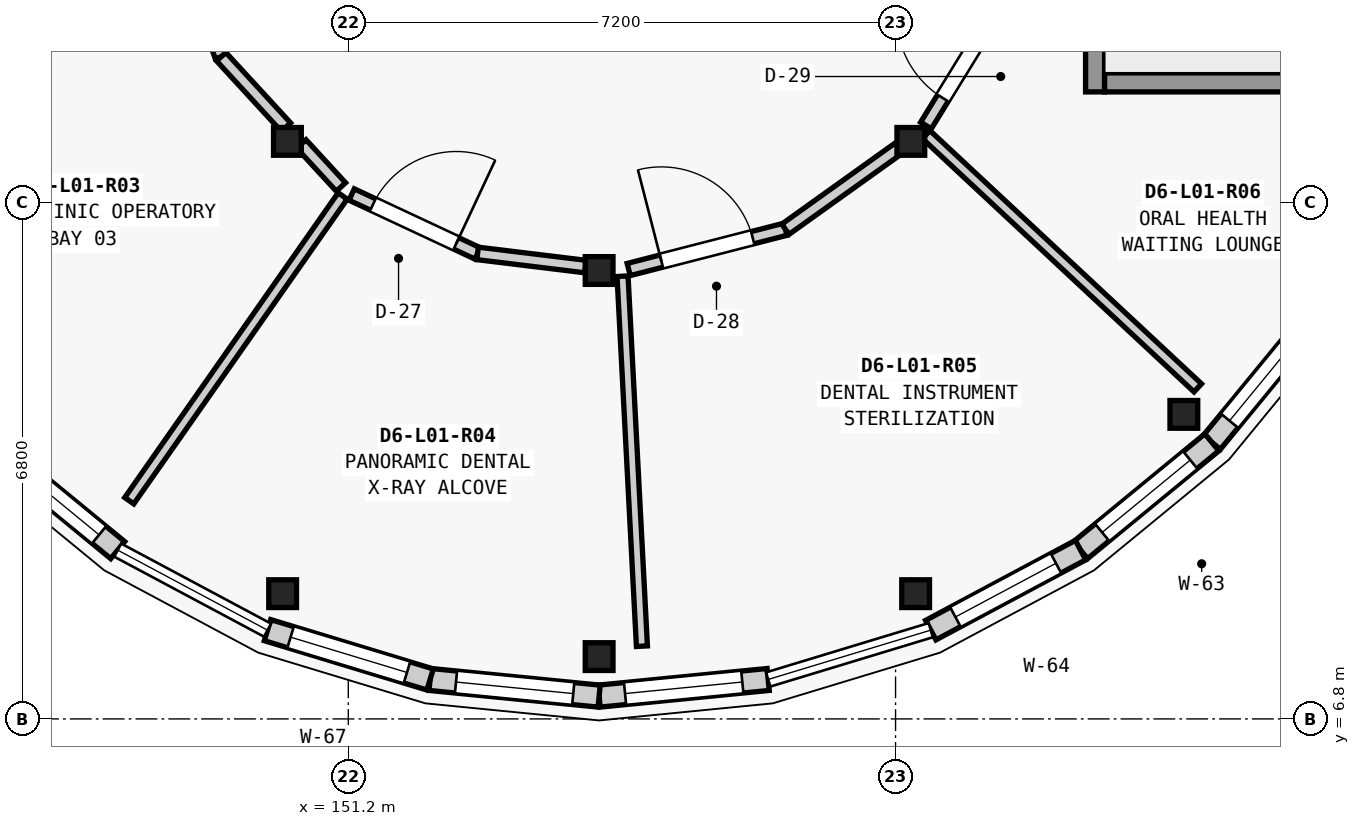
"""IFC4 building model, lengths in metres.
Left out: names, types, materials, properties, quantities, classifications, styles, units other than length and angle.
Written with IfcOpenShell. Run it as: python <this file> out.ifc"""

import sys

from ifc_helpers import new_model, si_unit, direction, frame, frame_2d, origin, origin_2d, place, context, subcontext, project, spatial, rectangle, extrude, element, fill, save


model = new_model("IFC4")
c1 = context("Model", 3, precision=1e-05, world=origin(), true_north=direction((0.0, 1.0)))
c2 = subcontext(c1, "Body", "Model", "MODEL_VIEW")
j1 = project(units=[si_unit("LENGTHUNIT", "METRE"), si_unit("PLANEANGLEUNIT", "RADIAN")], contexts=[c1])
p1 = place(None, origin())
s1 = spatial("IfcSite", under=j1, at=p1, CompositionType="ELEMENT")
p2 = place(p1, origin())
s2 = spatial("IfcBuilding", under=s1, at=p2, CompositionType="ELEMENT")
p3 = place(p2, frame((0.0, 0.0, 4.55)))
s3 = spatial("IfcBuildingStorey", under=s2, at=p3, CompositionType="ELEMENT", Elevation=4.55)
for number, where, z_axis, x_axis in (
    (1, (150.336, 8.448, 0.0), (0.0, 0.0, 1.0), (1.0, 0.0, 0.0)),
    (2, (154.5, 7.62, 0.0), (0.0, 0.0, 1.0), (1.0, 0.0, 0.0)),
    (3, (158.664, 8.448, 0.0), (0.0, 0.0, 1.0), (1.0, 0.0, 0.0)),
    (4, (162.193, 10.807, 0.0), (0.0, 0.0, 1.0), (1.0, 0.0, 0.0)),
    (5, (150.399, 14.399, 0.0), (0.0, 0.0, 1.0), (1.0, 0.0, 0.0)),
    (6, (154.5, 12.7, 0.0), (0.0, 0.0, 1.0), (1.0, 0.0, 0.0)),
    (7, (158.601, 14.399, 0.0), (0.0, 0.0, 1.0), (1.0, 0.0, 0.0)),
):
    element("IfcColumn", number, at=place(p3, frame(where, z_axis=z_axis, x_axis=x_axis)), inside=s3, PredefinedType="COLUMN", context=c2, shape_type="SweptSolid", body=[
        extrude(rectangle(XDim=0.365, YDim=0.365, at=origin_2d()), origin(), (0.0, 0.0, 1.0), 4.2),
    ])
p4 = place(p3, frame((163.979, 12.166, 0.0), z_axis=(0.0, 0.0, 1.0), x_axis=(-0.63455767339, -0.772875513354, 0.0)))
e8 = element("IfcWall", 8, at=p4, inside=s3, PredefinedType="ELEMENTEDWALL", context=c2, shape_type="SweptSolid", body=[
    extrude(rectangle(XDim=2.235, YDim=0.29, at=frame_2d((1.117, 0.0))), origin(), (0.0, 0.0, 1.0), 3.309),
])
p5 = place(p4, frame((0.367, 0.0, 0.85)))
e9 = element("IfcOpeningElement", 9, at=p5, cuts=e8, PredefinedType="OPENING", context=c2, shape_type="SweptSolid", body=[
    extrude(rectangle(XDim=1.5, YDim=1.3, at=frame_2d((0.75, 0.65))), frame((0.0, 0.155, 0.0), z_axis=(0.0, -1.0, 0.0), x_axis=(1.0, 0.0, 0.0)), (0.0, 0.0, 1.0), 0.31),
])
p6 = place(p3, frame((162.561, 10.439, 0.0), z_axis=(0.0, 0.0, 1.0), x_axis=(-0.772875513354, -0.63455767339, 0.0)))
e10 = element("IfcWall", 10, at=p6, inside=s3, PredefinedType="ELEMENTEDWALL", context=c2, shape_type="SweptSolid", body=[
    extrude(rectangle(XDim=2.235, YDim=0.29, at=frame_2d((1.117, 0.0))), origin(), (0.0, 0.0, 1.0), 3.309),
])
p7 = place(p6, frame((0.367, 0.0, 0.85)))
e11 = element("IfcOpeningElement", 11, at=p7, cuts=e10, PredefinedType="OPENING", context=c2, shape_type="SweptSolid", body=[
    extrude(rectangle(XDim=1.5, YDim=1.65, at=frame_2d((0.75, 0.825))), frame((0.0, 0.155, 0.0), z_axis=(0.0, -1.0, 0.0), x_axis=(1.0, 0.0, 0.0)), (0.0, 0.0, 1.0), 0.31),
])
p8 = place(p3, frame((160.834, 9.021, 0.0), z_axis=(0.0, 0.0, 1.0), x_axis=(-0.882017012185, -0.471217561446, 0.0)))
e12 = element("IfcWall", 12, at=p8, inside=s3, PredefinedType="ELEMENTEDWALL", context=c2, shape_type="SweptSolid", body=[
    extrude(rectangle(XDim=2.235, YDim=0.29, at=frame_2d((1.117, 0.0))), origin(), (0.0, 0.0, 1.0), 3.309),
])
p9 = place(p8, frame((0.367, 0.0, 0.85)))
e13 = element("IfcOpeningElement", 13, at=p9, cuts=e12, PredefinedType="OPENING", context=c2, shape_type="SweptSolid", body=[
    extrude(rectangle(XDim=1.5, YDim=1.95, at=frame_2d((0.75, 0.975))), frame((0.0, 0.155, 0.0), z_axis=(0.0, -1.0, 0.0), x_axis=(1.0, 0.0, 0.0)), (0.0, 0.0, 1.0), 0.31),
])
p10 = place(p3, frame((156.724, 7.319, 0.0), z_axis=(0.0, 0.0, 1.0), x_axis=(-0.995187461503, -0.097989369151, 0.0)))
e14 = element("IfcWall", 14, at=p10, inside=s3, PredefinedType="ELEMENTEDWALL", context=c2, shape_type="SweptSolid", body=[
    extrude(rectangle(XDim=2.235, YDim=0.29, at=frame_2d((1.117, 0.0))), origin(), (0.0, 0.0, 1.0), 3.309),
])
p11 = place(p10, frame((0.342, 0.0, 0.85)))
e15 = element("IfcOpeningElement", 15, at=p11, cuts=e14, PredefinedType="OPENING", context=c2, shape_type="SweptSolid", body=[
    extrude(rectangle(XDim=1.55, YDim=1.5, at=frame_2d((0.775, 0.75))), frame((0.0, 0.155, 0.0), z_axis=(0.0, -1.0, 0.0), x_axis=(1.0, 0.0, 0.0)), (0.0, 0.0, 1.0), 0.31),
])
p12 = place(p3, frame((154.5, 7.1, 0.0), z_axis=(0.0, 0.0, 1.0), x_axis=(-0.995187461503, 0.097989369151, 0.0)))
e16 = element("IfcWall", 16, at=p12, inside=s3, PredefinedType="ELEMENTEDWALL", context=c2, shape_type="SweptSolid", body=[
    extrude(rectangle(XDim=2.235, YDim=0.29, at=frame_2d((1.117, 0.0))), origin(), (0.0, 0.0, 1.0), 3.309),
])
p13 = place(p12, frame((0.342, 0.0, 0.85)))
e17 = element("IfcOpeningElement", 17, at=p13, cuts=e16, PredefinedType="OPENING", context=c2, shape_type="SweptSolid", body=[
    extrude(rectangle(XDim=1.55, YDim=1.8, at=frame_2d((0.775, 0.9))), frame((0.0, 0.155, 0.0), z_axis=(0.0, -1.0, 0.0), x_axis=(1.0, 0.0, 0.0)), (0.0, 0.0, 1.0), 0.31),
])
p14 = place(p3, frame((152.276, 7.319, 0.0), z_axis=(0.0, 0.0, 1.0), x_axis=(-0.956928814218, 0.290322655883, 0.0)))
e18 = element("IfcWall", 18, at=p14, inside=s3, PredefinedType="ELEMENTEDWALL", context=c2, shape_type="SweptSolid", body=[
    extrude(rectangle(XDim=2.235, YDim=0.29, at=frame_2d((1.118, 0.0))), origin(), (0.0, 0.0, 1.0), 3.309),
])
p15 = place(p14, frame((0.318, 0.0, 0.85)))
e19 = element("IfcOpeningElement", 19, at=p15, cuts=e18, PredefinedType="OPENING", context=c2, shape_type="SweptSolid", body=[
    extrude(rectangle(XDim=1.6, YDim=1.55, at=frame_2d((0.8, 0.775))), frame((0.0, 0.155, 0.0), z_axis=(0.0, -1.0, 0.0), x_axis=(1.0, 0.0, 0.0)), (0.0, 0.0, 1.0), 0.31),
])
p16 = place(p3, frame((148.166, 9.021, 0.0), z_axis=(0.0, 0.0, 1.0), x_axis=(-0.772875513354, 0.63455767339, 0.0)))
e20 = element("IfcWall", 20, at=p16, inside=s3, PredefinedType="ELEMENTEDWALL", context=c2, shape_type="SweptSolid", body=[
    extrude(rectangle(XDim=2.235, YDim=0.29, at=frame_2d((1.117, 0.0))), origin(), (0.0, 0.0, 1.0), 3.309),
])
p17 = place(p16, frame((0.317, 0.0, 0.85)))
e21 = element("IfcOpeningElement", 21, at=p17, cuts=e20, PredefinedType="OPENING", context=c2, shape_type="SweptSolid", body=[
    extrude(rectangle(XDim=1.6, YDim=1.85, at=frame_2d((0.8, 0.925))), frame((0.0, 0.155, 0.0), z_axis=(0.0, -1.0, 0.0), x_axis=(1.0, 0.0, 0.0)), (0.0, 0.0, 1.0), 0.31),
])
p18 = place(p3, frame((161.025, 21.95, 0.0), z_axis=(0.0, 0.0, 1.0), x_axis=(0.0, -1.0, 0.0)))
e22 = element("IfcWall", 22, at=p18, inside=s3, PredefinedType="SHEAR", context=c2, shape_type="SweptSolid", body=[
    extrude(rectangle(XDim=6.9, YDim=0.25, at=frame_2d((3.45, 0.0))), origin(), (0.0, 0.0, 1.0), 3.955),
])
p19 = place(p18, frame((0.43, 0.0, 0.0)))
e23 = element("IfcOpeningElement", 23, at=p19, cuts=e22, PredefinedType="OPENING", context=c2, shape_type="SweptSolid", body=[
    extrude(rectangle(XDim=1.1, YDim=2.15, at=frame_2d((0.55, 1.075))), frame((0.0, 0.135, 0.0), z_axis=(0.0, -1.0, 0.0), x_axis=(1.0, 0.0, 0.0)), (0.0, 0.0, 1.0), 0.27),
])
p20 = place(p3, frame((161.15, 15.175, 0.0), z_axis=(0.0, 0.0, 1.0), x_axis=(1.0, 0.0, 0.0)))
e24 = element("IfcWall", 24, at=p20, inside=s3, PredefinedType="SHEAR", context=c2, shape_type="SweptSolid", body=[
    extrude(rectangle(XDim=2.9, YDim=0.25, at=frame_2d((1.45, 0.0))), origin(), (0.0, 0.0, 1.0), 3.955),
])
p21 = place(p3, frame((151.126, 13.681, 0.0), z_axis=(0.0, 0.0, 1.0), x_axis=(-0.573579487823, -0.819149907617, 0.0)))
e25 = element("IfcWall", 25, at=p21, inside=s3, PredefinedType="PARTITIONING", context=c2, shape_type="SweptSolid", body=[
    extrude(rectangle(XDim=4.895, YDim=0.145, at=frame_2d((2.448, 0.0))), origin(), (0.0, 0.0, 1.0), 3.284),
])
p22 = place(p3, frame((154.808, 12.625, 0.0), z_axis=(0.0, 0.0, 1.0), x_axis=(0.05228807127, -0.998632043148, 0.0)))
e26 = element("IfcWall", 26, at=p22, inside=s3, PredefinedType="PARTITIONING", context=c2, shape_type="SweptSolid", body=[
    extrude(rectangle(XDim=4.875, YDim=0.145, at=frame_2d((2.437, 0.0))), origin(), (0.0, 0.0, 1.0), 3.284),
])
p23 = place(p3, frame((158.803, 14.488, 0.0), z_axis=(0.0, 0.0, 1.0), x_axis=(0.731337706655, -0.682015512158, 0.0)))
e27 = element("IfcWall", 27, at=p23, inside=s3, PredefinedType="PARTITIONING", context=c2, shape_type="SweptSolid", body=[
    extrude(rectangle(XDim=4.885, YDim=0.145, at=frame_2d((2.443, 0.0))), origin(), (0.0, 0.0, 1.0), 3.284),
])
p24 = place(p3, frame((148.754, 17.708, 0.0), z_axis=(0.0, 0.0, 1.0), x_axis=(0.332606133603, -0.943065830093, 0.0)))
e28 = element("IfcWall", 28, at=p24, inside=s3, PredefinedType="PARTITIONING", context=c2, shape_type="SweptSolid", body=[
    extrude(rectangle(XDim=2.328, YDim=0.165, at=frame_2d((1.164, 0.0))), origin(), (0.0, 0.0, 1.0), 3.284),
])
p25 = place(p24, frame((0.569, 0.0, 0.0)))
e29 = element("IfcOpeningElement", 29, at=p25, cuts=e28, PredefinedType="OPENING", context=c2, shape_type="SweptSolid", body=[
    extrude(rectangle(XDim=1.19, YDim=2.26, at=frame_2d((0.595, 1.13))), frame((0.0, 0.093, 0.0), z_axis=(0.0, -1.0, 0.0), x_axis=(1.0, 0.0, 0.0)), (0.0, 0.0, 1.0), 0.185),
])
p26 = place(p3, frame((149.528, 15.513, 0.0), z_axis=(0.0, 0.0, 1.0), x_axis=(0.676611080709, -0.736340577085, 0.0)))
e30 = element("IfcWall", 30, at=p26, inside=s3, PredefinedType="PARTITIONING", context=c2, shape_type="SweptSolid", body=[
    extrude(rectangle(XDim=1.259, YDim=0.165, at=frame_2d((0.629, 0.0))), origin(), (0.0, 0.0, 1.0), 3.284),
])
p27 = place(p3, frame((150.583, 14.365, 0.0), z_axis=(0.0, 0.0, 1.0), x_axis=(0.676615979647, -0.736336075503, 0.0)))
e31 = element("IfcWall", 31, at=p27, inside=s3, PredefinedType="PARTITIONING", context=c2, shape_type="SweptSolid", body=[
    extrude(rectangle(XDim=0.769, YDim=0.165, at=frame_2d((0.384, 0.0))), origin(), (0.0, 0.0, 1.0), 3.284),
])
p28 = place(p3, frame((151.244, 13.7, 0.0), z_axis=(0.0, 0.0, 1.0), x_axis=(0.905838456469, -0.423623288763, 0.0)))
e32 = element("IfcWall", 32, at=p28, inside=s3, PredefinedType="PARTITIONING", context=c2, shape_type="SweptSolid", body=[
    extrude(rectangle(XDim=1.829, YDim=0.165, at=frame_2d((0.915, 0.0))), origin(), (0.0, 0.0, 1.0), 3.284),
])
p29 = place(p28, frame((0.31, 0.0, 0.0)))
e33 = element("IfcOpeningElement", 33, at=p29, cuts=e32, PredefinedType="OPENING", context=c2, shape_type="SweptSolid", body=[
    extrude(rectangle(XDim=1.21, YDim=2.16, at=frame_2d((0.605, 1.08))), frame((0.0, 0.093, 0.0), z_axis=(0.0, -1.0, 0.0), x_axis=(1.0, 0.0, 0.0)), (0.0, 0.0, 1.0), 0.185),
])
p30 = place(p3, frame((152.901, 12.925, 0.0), z_axis=(0.0, 0.0, 1.0), x_axis=(0.992643875507, -0.12107079094, 0.0)))
e34 = element("IfcWall", 34, at=p30, inside=s3, PredefinedType="PARTITIONING", context=c2, shape_type="SweptSolid", body=[
    extrude(rectangle(XDim=1.43, YDim=0.165, at=frame_2d((0.715, 0.0))), origin(), (0.0, 0.0, 1.0), 3.284),
])
p31 = place(p3, frame((154.889, 12.713, 0.0), z_axis=(0.0, 0.0, 1.0), x_axis=(0.968515845244, 0.248951918071, 0.0)))
e35 = element("IfcWall", 35, at=p31, inside=s3, PredefinedType="PARTITIONING", context=c2, shape_type="SweptSolid", body=[
    extrude(rectangle(XDim=2.129, YDim=0.165, at=frame_2d((1.064, 0.0))), origin(), (0.0, 0.0, 1.0), 3.284),
])
p32 = place(p31, frame((0.444, 0.0, 0.0)))
e36 = element("IfcOpeningElement", 36, at=p32, cuts=e35, PredefinedType="OPENING", context=c2, shape_type="SweptSolid", body=[
    extrude(rectangle(XDim=1.24, YDim=2.22, at=frame_2d((0.62, 1.11))), frame((0.0, 0.093, 0.0), z_axis=(0.0, -1.0, 0.0), x_axis=(1.0, 0.0, 0.0)), (0.0, 0.0, 1.0), 0.185),
])
p33 = place(p3, frame((156.951, 13.243, 0.0), z_axis=(0.0, 0.0, 1.0), x_axis=(0.813273111974, 0.581882157606, 0.0)))
e37 = element("IfcWall", 37, at=p33, inside=s3, PredefinedType="PARTITIONING", context=c2, shape_type="SweptSolid", body=[
    extrude(rectangle(XDim=1.828, YDim=0.165, at=frame_2d((0.914, 0.0))), origin(), (0.0, 0.0, 1.0), 3.284),
])
p34 = place(p3, frame((158.8, 14.608, 0.0), z_axis=(0.0, 0.0, 1.0), x_axis=(0.523860609665, 0.851804004241, 0.0)))
e38 = element("IfcWall", 38, at=p34, inside=s3, PredefinedType="PARTITIONING", context=c2, shape_type="SweptSolid", body=[
    extrude(rectangle(XDim=2.128, YDim=0.165, at=frame_2d((1.064, 0.0))), origin(), (0.0, 0.0, 1.0), 3.284),
])
p35 = place(p34, frame((0.424, 0.0, 0.0)))
e39 = element("IfcOpeningElement", 39, at=p35, cuts=e38, PredefinedType="OPENING", context=c2, shape_type="SweptSolid", body=[
    extrude(rectangle(XDim=1.28, YDim=2.3, at=frame_2d((0.64, 1.15))), frame((0.0, 0.093, 0.0), z_axis=(0.0, -1.0, 0.0), x_axis=(1.0, 0.0, 0.0)), (0.0, 0.0, 1.0), 0.185),
])
p36 = place(p5, origin())
e40 = element("IfcWindow", 40, at=p36, inside=s3, PartitioningType="SINGLE_PANEL", PredefinedType="WINDOW", context=c2, shape_type="SweptSolid", body=[
    extrude(rectangle(XDim=1.5, YDim=1.3, at=frame_2d((0.75, 0.65))), frame((0.0, 0.03, 0.0), z_axis=(0.0, -1.0, 0.0), x_axis=(1.0, 0.0, 0.0)), (0.0, 0.0, 1.0), 0.06),
])
fill(e9, e40)
p37 = place(p7, origin())
e41 = element("IfcWindow", 41, at=p37, inside=s3, PartitioningType="SINGLE_PANEL", PredefinedType="WINDOW", context=c2, shape_type="SweptSolid", body=[
    extrude(rectangle(XDim=1.5, YDim=1.65, at=frame_2d((0.75, 0.825))), frame((0.0, 0.03, 0.0), z_axis=(0.0, -1.0, 0.0), x_axis=(1.0, 0.0, 0.0)), (0.0, 0.0, 1.0), 0.06),
])
fill(e11, e41)
p38 = place(p9, origin())
e42 = element("IfcWindow", 42, at=p38, inside=s3, PartitioningType="SINGLE_PANEL", PredefinedType="WINDOW", context=c2, shape_type="SweptSolid", body=[
    extrude(rectangle(XDim=1.5, YDim=1.95, at=frame_2d((0.75, 0.975))), frame((0.0, 0.03, 0.0), z_axis=(0.0, -1.0, 0.0), x_axis=(1.0, 0.0, 0.0)), (0.0, 0.0, 1.0), 0.06),
])
fill(e13, e42)
p39 = place(p11, origin())
e43 = element("IfcWindow", 43, at=p39, inside=s3, PartitioningType="SINGLE_PANEL", PredefinedType="WINDOW", context=c2, shape_type="SweptSolid", body=[
    extrude(rectangle(XDim=1.55, YDim=1.5, at=frame_2d((0.775, 0.75))), frame((0.0, 0.03, 0.0), z_axis=(0.0, -1.0, 0.0), x_axis=(1.0, 0.0, 0.0)), (0.0, 0.0, 1.0), 0.06),
])
fill(e15, e43)
p40 = place(p13, origin())
e44 = element("IfcWindow", 44, at=p40, inside=s3, PartitioningType="SINGLE_PANEL", PredefinedType="WINDOW", context=c2, shape_type="SweptSolid", body=[
    extrude(rectangle(XDim=1.55, YDim=1.8, at=frame_2d((0.775, 0.9))), frame((0.0, 0.03, 0.0), z_axis=(0.0, -1.0, 0.0), x_axis=(1.0, 0.0, 0.0)), (0.0, 0.0, 1.0), 0.06),
])
fill(e17, e44)
p41 = place(p15, origin())
e45 = element("IfcWindow", 45, at=p41, inside=s3, PartitioningType="SINGLE_PANEL", PredefinedType="WINDOW", context=c2, shape_type="SweptSolid", body=[
    extrude(rectangle(XDim=1.6, YDim=1.55, at=frame_2d((0.8, 0.775))), frame((0.0, 0.03, 0.0), z_axis=(0.0, -1.0, 0.0), x_axis=(1.0, 0.0, 0.0)), (0.0, 0.0, 1.0), 0.06),
])
fill(e19, e45)
p42 = place(p17, origin())
e46 = element("IfcWindow", 46, at=p42, inside=s3, PartitioningType="SINGLE_PANEL", PredefinedType="WINDOW", context=c2, shape_type="SweptSolid", body=[
    extrude(rectangle(XDim=1.6, YDim=1.85, at=frame_2d((0.8, 0.925))), frame((0.0, 0.03, 0.0), z_axis=(0.0, -1.0, 0.0), x_axis=(1.0, 0.0, 0.0)), (0.0, 0.0, 1.0), 0.06),
])
fill(e21, e46)
p43 = place(p29, origin())
e47 = element("IfcDoor", 47, at=p43, inside=s3, OperationType="SINGLE_SWING_RIGHT", PredefinedType="DOOR", context=c2, shape_type="SweptSolid", body=[
    extrude(rectangle(XDim=1.21, YDim=2.16, at=frame_2d((0.605, 1.08))), frame((0.0, 0.025, 0.0), z_axis=(0.0, -1.0, 0.0), x_axis=(1.0, 0.0, 0.0)), (0.0, 0.0, 1.0), 0.05),
])
fill(e33, e47)
p44 = place(p32, origin())
e48 = element("IfcDoor", 48, at=p44, inside=s3, OperationType="SINGLE_SWING_LEFT", PredefinedType="DOOR", context=c2, shape_type="SweptSolid", body=[
    extrude(rectangle(XDim=1.24, YDim=2.22, at=frame_2d((0.62, 1.11))), frame((0.0, 0.025, 0.0), z_axis=(0.0, -1.0, 0.0), x_axis=(1.0, 0.0, 0.0)), (0.0, 0.0, 1.0), 0.05),
])
fill(e36, e48)
p45 = place(p35, origin())
e49 = element("IfcDoor", 49, at=p45, inside=s3, OperationType="SINGLE_SWING_RIGHT", PredefinedType="DOOR", context=c2, shape_type="SweptSolid", body=[
    extrude(rectangle(XDim=1.28, YDim=2.3, at=frame_2d((0.64, 1.15))), frame((0.0, 0.025, 0.0), z_axis=(0.0, -1.0, 0.0), x_axis=(1.0, 0.0, 0.0)), (0.0, 0.0, 1.0), 0.05),
])
fill(e39, e49)
save(model, sys.argv[1])
